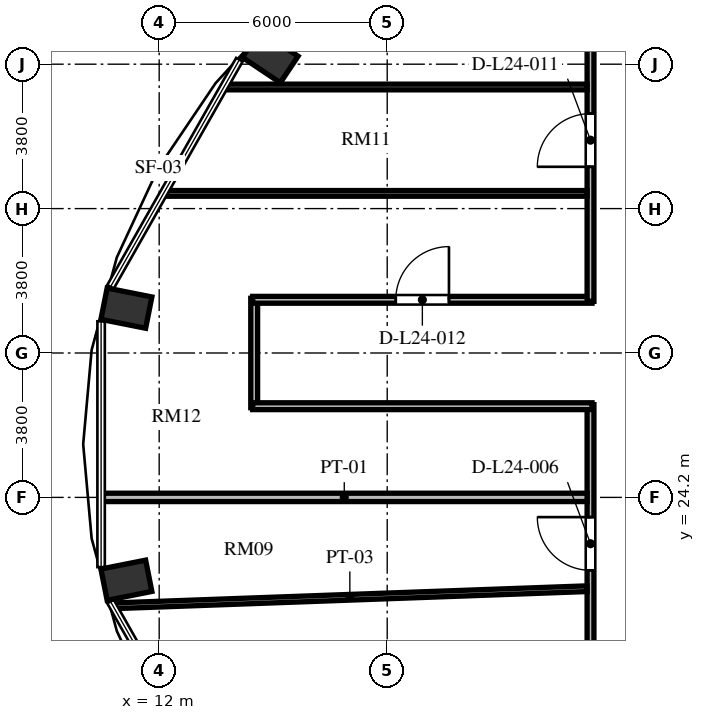
"""IFC4 building model, lengths in metres.
Left out: names, types, materials, properties, quantities, classifications, styles, units other than length and angle.
Written with IfcOpenShell. Run it as: python <this file> out.ifc"""

import sys

from ifc_helpers import new_model, si_unit, direction, frame, frame_2d, origin, origin_2d, place, context, subcontext, project, spatial, rectangle, extrude, element, fill, save


model = new_model("IFC4")
c1 = context("Model", 3, precision=1e-05, world=origin(), true_north=direction((0.0, 1.0)))
c2 = subcontext(c1, "Body", "Model", "MODEL_VIEW")
j1 = project(units=[si_unit("LENGTHUNIT", "METRE"), si_unit("PLANEANGLEUNIT", "RADIAN")], contexts=[c1])
p1 = place(None, origin())
s1 = spatial("IfcSite", under=j1, at=p1, CompositionType="ELEMENT")
p2 = place(p1, origin())
s2 = spatial("IfcBuilding", under=s1, at=p2, CompositionType="ELEMENT")
p3 = place(p2, frame((0.0, 0.0, 96.336)))
s3 = spatial("IfcBuildingStorey", under=s2, at=p3, CompositionType="ELEMENT", Elevation=96.336)
for number, where, z_axis, x_axis in (
    (1, (14.922, 35.795, 0.0), (0.0, 0.0, 1.0), (-0.831, 0.556, 0.0)),
    (2, (11.137, 29.18, 0.0), (0.0, 0.0, 1.0), (-0.981, 0.195, 0.0)),
    (3, (11.137, 22.02, 0.0), (0.0, 0.0, 1.0), (-0.981, -0.195, 0.0)),
):
    element("IfcColumn", number, at=place(p3, frame(where, z_axis=z_axis, x_axis=x_axis)), inside=s3, PredefinedType="COLUMN", context=c2, shape_type="SweptSolid", body=[
        extrude(rectangle(XDim=1.2, YDim=0.84, at=origin_2d()), origin(), (0.0, 0.0, 1.0), 3.648),
    ])
p4 = place(p3, frame((14.5, 26.56, 0.0), z_axis=(0.0, 0.0, 1.0), x_axis=(0.0, 1.0, 0.0)))
e4 = element("IfcWall", 4, at=p4, inside=s3, PredefinedType="PARTITIONING", context=c2, shape_type="SweptSolid", body=[
    extrude(rectangle(XDim=2.88, YDim=0.18, at=frame_2d((1.44, 0.0))), origin(), (0.0, 0.0, 1.0), 3.013),
])
p5 = place(p3, frame((14.46, 29.4, 0.0), z_axis=(0.0, 0.0, 1.0), x_axis=(1.0, 0.0, 0.0)))
e5 = element("IfcWall", 5, at=p5, inside=s3, PredefinedType="PARTITIONING", context=c2, shape_type="SweptSolid", body=[
    extrude(rectangle(XDim=8.93, YDim=0.18, at=frame_2d((4.465, 0.0))), origin(), (0.0, 0.0, 1.0), 3.428),
])
p6 = place(p5, frame((3.765, 0.0, 0.0)))
e6 = element("IfcOpeningElement", 6, at=p6, cuts=e5, PredefinedType="OPENING", context=c2, shape_type="SweptSolid", body=[
    extrude(rectangle(XDim=1.4, YDim=2.2, at=frame_2d((0.7, 1.1))), frame((0.0, 0.1, 0.0), z_axis=(0.0, -1.0, 0.0), x_axis=(1.0, 0.0, 0.0)), (0.0, 0.0, 1.0), 0.2),
])
p7 = place(p3, frame((23.35, 29.36, 0.0), z_axis=(0.0, 0.0, 1.0), x_axis=(0.0, 1.0, 0.0)))
e7 = element("IfcWall", 7, at=p7, inside=s3, PredefinedType="PARTITIONING", context=c2, shape_type="SweptSolid", body=[
    extrude(rectangle(XDim=9.43, YDim=0.18, at=frame_2d((4.715, 0.0))), origin(), (0.0, 0.0, 1.0), 3.428),
])
p8 = place(p7, frame((3.54, 0.0, 0.0)))
e8 = element("IfcOpeningElement", 8, at=p8, cuts=e7, PredefinedType="OPENING", context=c2, shape_type="SweptSolid", body=[
    extrude(rectangle(XDim=1.4, YDim=2.2, at=frame_2d((0.7, 1.1))), frame((0.0, 0.1, 0.0), z_axis=(0.0, -1.0, 0.0), x_axis=(1.0, 0.0, 0.0)), (0.0, 0.0, 1.0), 0.2),
])
p9 = place(p3, frame((23.35, 17.36, 0.0), z_axis=(0.0, 0.0, 1.0), x_axis=(0.0, 1.0, 0.0)))
e9 = element("IfcWall", 9, at=p9, inside=s3, PredefinedType="PARTITIONING", context=c2, shape_type="SweptSolid", body=[
    extrude(rectangle(XDim=9.28, YDim=0.18, at=frame_2d((4.64, 0.0))), origin(), (0.0, 0.0, 1.0), 3.428),
])
p10 = place(p9, frame((4.921, 0.0, 0.0)))
e10 = element("IfcOpeningElement", 10, at=p10, cuts=e9, PredefinedType="OPENING", context=c2, shape_type="SweptSolid", body=[
    extrude(rectangle(XDim=1.4, YDim=2.2, at=frame_2d((0.7, 1.1))), frame((0.0, 0.1, 0.0), z_axis=(0.0, -1.0, 0.0), x_axis=(1.0, 0.0, 0.0)), (0.0, 0.0, 1.0), 0.2),
])
p11 = place(p3, frame((23.39, 26.6, 0.0), z_axis=(0.0, 0.0, 1.0), x_axis=(-1.0, 0.0, 0.0)))
e11 = element("IfcWall", 11, at=p11, inside=s3, PredefinedType="PARTITIONING", context=c2, shape_type="SweptSolid", body=[
    extrude(rectangle(XDim=8.93, YDim=0.18, at=frame_2d((4.465, 0.0))), origin(), (0.0, 0.0, 1.0), 3.428),
])
p12 = place(p3, frame((10.774, 21.346, 0.0), z_axis=(0.0, 0.0, 1.0), x_axis=(0.999347780952, 0.036111116092, 0.0)))
e12 = element("IfcWall", 12, at=p12, inside=s3, PredefinedType="PARTITIONING", context=c2, shape_type="SweptSolid", body=[
    extrude(rectangle(XDim=12.494, YDim=0.15, at=frame_2d((6.247, 0.0))), origin(), (0.0, 0.0, 1.0), 2.813),
])
p13 = place(p3, frame((10.48, 24.2, 0.0), z_axis=(0.0, 0.0, 1.0), x_axis=(1.0, 0.0, 0.0)))
e13 = element("IfcWall", 13, at=p13, inside=s3, PredefinedType="PARTITIONING", context=c2, shape_type="SweptSolid", body=[
    extrude(rectangle(XDim=12.78, YDim=0.22, at=frame_2d((6.39, 0.0))), origin(), (0.0, 0.0, 1.0), 3.428),
])
p14 = place(p3, frame((12.121, 32.2, 0.0), z_axis=(0.0, 0.0, 1.0), x_axis=(1.0, 0.0, 0.0)))
e14 = element("IfcWall", 14, at=p14, inside=s3, PredefinedType="PARTITIONING", context=c2, shape_type="SweptSolid", body=[
    extrude(rectangle(XDim=11.139, YDim=0.15, at=frame_2d((5.57, 0.0))), origin(), (0.0, 0.0, 1.0), 3.428),
])
p15 = place(p3, frame((13.71, 35.0, 0.0), z_axis=(0.0, 0.0, 1.0), x_axis=(1.0, 0.0, 0.0)))
e15 = element("IfcWall", 15, at=p15, inside=s3, PredefinedType="PARTITIONING", context=c2, shape_type="SweptSolid", body=[
    extrude(rectangle(XDim=9.55, YDim=0.15, at=frame_2d((4.775, 0.0))), origin(), (0.0, 0.0, 1.0), 3.428),
])
p16 = place(p10, origin())
e16 = element("IfcDoor", 16, at=p16, inside=s3, OperationType="SINGLE_SWING_RIGHT", PredefinedType="DOOR", context=c2, shape_type="SweptSolid", body=[
    extrude(rectangle(XDim=1.4, YDim=2.2, at=frame_2d((0.7, 1.1))), frame((0.0, 0.025, 0.0), z_axis=(0.0, -1.0, 0.0), x_axis=(1.0, 0.0, 0.0)), (0.0, 0.0, 1.0), 0.05),
])
fill(e10, e16)
p17 = place(p8, origin())
e17 = element("IfcDoor", 17, at=p17, inside=s3, OperationType="SINGLE_SWING_LEFT", PredefinedType="DOOR", context=c2, shape_type="SweptSolid", body=[
    extrude(rectangle(XDim=1.4, YDim=2.2, at=frame_2d((0.7, 1.1))), frame((0.0, 0.025, 0.0), z_axis=(0.0, -1.0, 0.0), x_axis=(1.0, 0.0, 0.0)), (0.0, 0.0, 1.0), 0.05),
])
fill(e8, e17)
p18 = place(p6, origin())
e18 = element("IfcDoor", 18, at=p18, inside=s3, OperationType="SINGLE_SWING_RIGHT", PredefinedType="DOOR", context=c2, shape_type="SweptSolid", body=[
    extrude(rectangle(XDim=1.4, YDim=2.2, at=frame_2d((0.7, 1.1))), frame((0.0, 0.025, 0.0), z_axis=(0.0, -1.0, 0.0), x_axis=(1.0, 0.0, 0.0)), (0.0, 0.0, 1.0), 0.05),
])
fill(e6, e18)
save(model, sys.argv[1])
